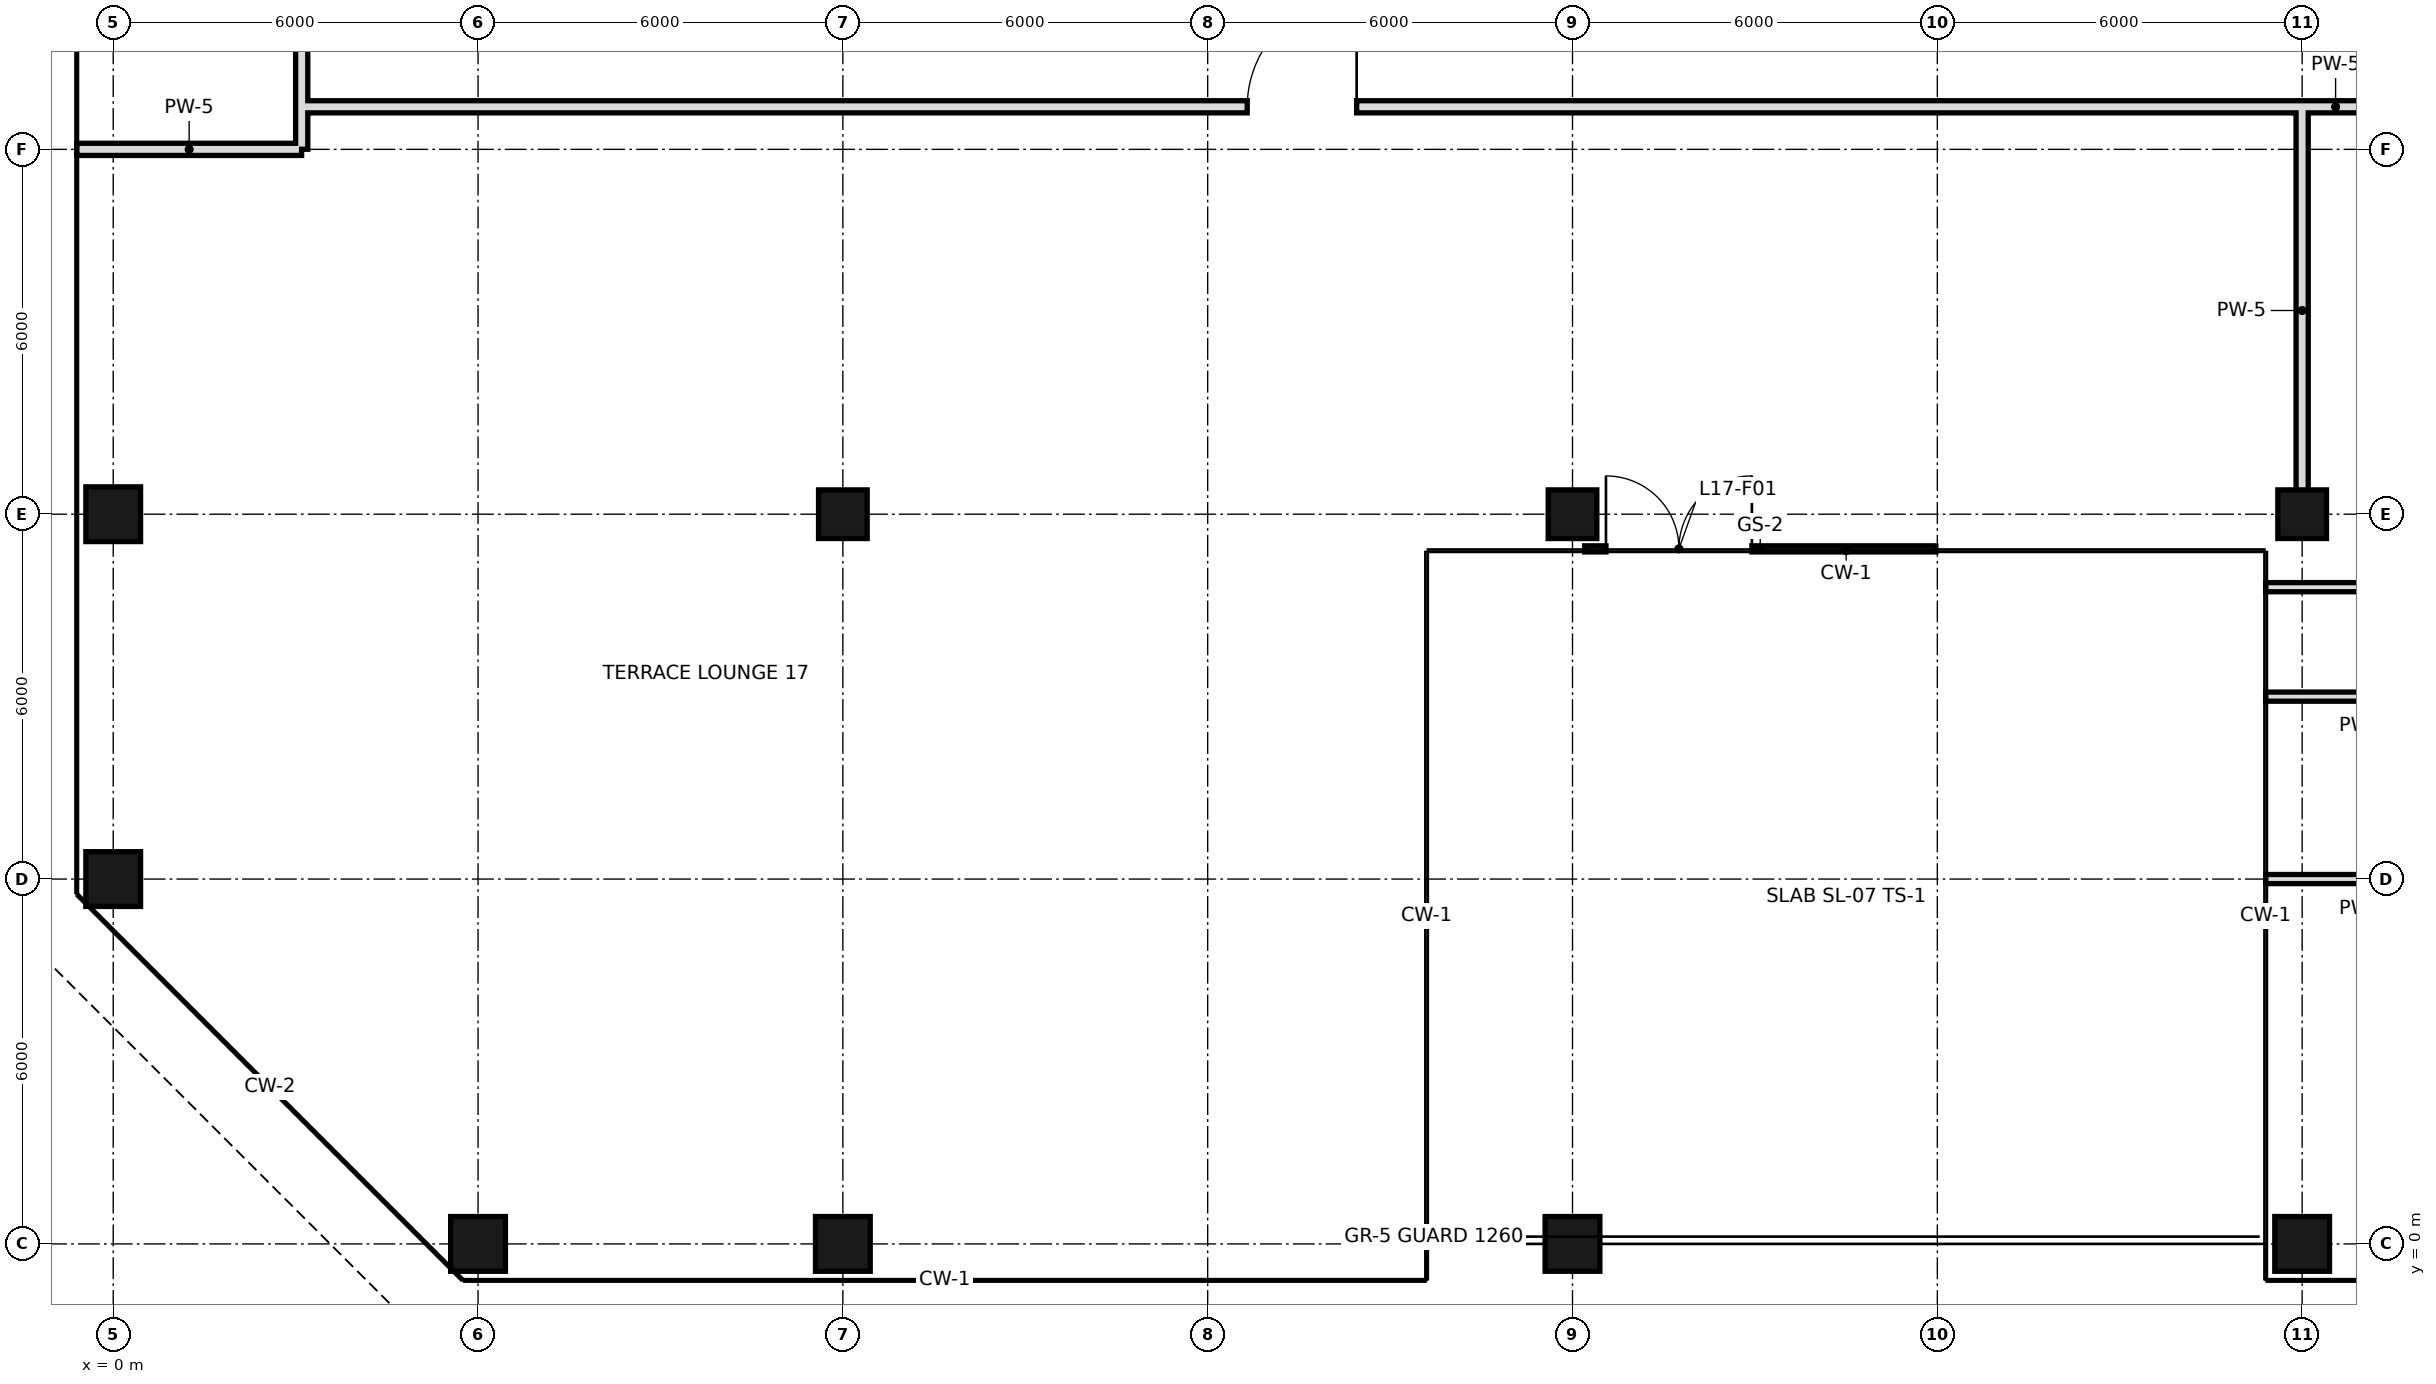
"""IFC4 building model, lengths in metres.
Left out: names, types, materials, properties, quantities, classifications, styles, units other than length and angle.
Written with IfcOpenShell. Run it as: python <this file> out.ifc"""

import sys

from ifc_helpers import new_model, si_unit, direction, frame, frame_2d, origin, origin_2d, place, context, subcontext, project, spatial, rectangle, hollow_rectangle, extrude, element, fill, save


model = new_model("IFC4")
c1 = context("Model", 3, precision=1e-05, world=origin(), true_north=direction((0.0, 1.0)))
c2 = subcontext(c1, "Body", "Model", "MODEL_VIEW")
j1 = project(units=[si_unit("LENGTHUNIT", "METRE"), si_unit("PLANEANGLEUNIT", "RADIAN")], contexts=[c1])
p1 = place(None, origin())
s1 = spatial("IfcSite", under=j1, at=p1, CompositionType="ELEMENT")
p2 = place(p1, origin())
s2 = spatial("IfcBuilding", under=s1, at=p2, CompositionType="ELEMENT")
p3 = place(p2, frame((0.0, 0.0, 82.2)))
s3 = spatial("IfcBuildingStorey", under=s2, at=p3, CompositionType="ELEMENT", Elevation=82.2)
for number, where, z_axis, x_axis in (
    (1, (0.0, 6.0, 0.0), (0.0, 0.0, 1.0), (1.0, 0.0, 0.0)),
    (2, (0.0, 12.0, 0.0), (0.0, 0.0, 1.0), (1.0, 0.0, 0.0)),
    (3, (6.0, 0.0, 0.0), (0.0, 0.0, 1.0), (1.0, 0.0, 0.0)),
    (4, (12.0, 0.0, 0.0), (0.0, 0.0, 1.0), (1.0, 0.0, 0.0)),
):
    element("IfcColumn", number, at=place(p3, frame(where, z_axis=z_axis, x_axis=x_axis)), inside=s3, PredefinedType="COLUMN", context=c2, shape_type="SweptSolid", body=[
        extrude(hollow_rectangle(XDim=0.9, YDim=0.9, WallThickness=0.045, at=origin_2d()), origin(), (0.0, 0.0, 1.0), 3.6),
    ])
p4 = place(p3, frame((12.0, 12.0, 0.0), z_axis=(0.0, 0.0, 1.0), x_axis=(1.0, 0.0, 0.0)))
e5 = element("IfcColumn", 5, at=p4, inside=s3, PredefinedType="COLUMN", context=c2, shape_type="SweptSolid", body=[
    extrude(hollow_rectangle(XDim=0.8, YDim=0.8, WallThickness=0.04, at=origin_2d()), origin(), (0.0, 0.0, 1.0), 3.6),
])
p5 = place(p3, frame((24.0, 0.0, 0.0), z_axis=(0.0, 0.0, 1.0), x_axis=(1.0, 0.0, 0.0)))
e6 = element("IfcColumn", 6, at=p5, inside=s3, PredefinedType="COLUMN", context=c2, shape_type="SweptSolid", body=[
    extrude(hollow_rectangle(XDim=0.9, YDim=0.9, WallThickness=0.045, at=origin_2d()), origin(), (0.0, 0.0, 1.0), 3.6),
])
p6 = place(p3, frame((24.0, 12.0, 0.0), z_axis=(0.0, 0.0, 1.0), x_axis=(1.0, 0.0, 0.0)))
e7 = element("IfcColumn", 7, at=p6, inside=s3, PredefinedType="COLUMN", context=c2, shape_type="SweptSolid", body=[
    extrude(hollow_rectangle(XDim=0.8, YDim=0.8, WallThickness=0.04, at=origin_2d()), origin(), (0.0, 0.0, 1.0), 3.6),
])
p7 = place(p3, frame((36.0, 0.0, 0.0), z_axis=(0.0, 0.0, 1.0), x_axis=(1.0, 0.0, 0.0)))
e8 = element("IfcColumn", 8, at=p7, inside=s3, PredefinedType="COLUMN", context=c2, shape_type="SweptSolid", body=[
    extrude(hollow_rectangle(XDim=0.9, YDim=0.9, WallThickness=0.045, at=origin_2d()), origin(), (0.0, 0.0, 1.0), 3.6),
])
p8 = place(p3, frame((36.0, 12.0, 0.0), z_axis=(0.0, 0.0, 1.0), x_axis=(1.0, 0.0, 0.0)))
e9 = element("IfcColumn", 9, at=p8, inside=s3, PredefinedType="COLUMN", context=c2, shape_type="SweptSolid", body=[
    extrude(hollow_rectangle(XDim=0.8, YDim=0.8, WallThickness=0.04, at=origin_2d()), origin(), (0.0, 0.0, 1.0), 3.6),
])
p9 = place(p3, frame((24.2, 11.43, 0.0), z_axis=(0.0, 0.0, 1.0), x_axis=(1.0, 0.0, 0.0)))
e10 = element("IfcWall", 10, at=p9, inside=s3, PredefinedType="SOLIDWALL", context=c2, shape_type="SweptSolid", body=[
    extrude(rectangle(XDim=5.775, YDim=0.1, at=frame_2d((2.888, 0.0))), origin(), (0.0, 0.0, 1.0), 3.42),
])
p10 = place(p9, frame((0.35, 0.0, 0.0)))
e11 = element("IfcOpeningElement", 11, at=p10, cuts=e10, PredefinedType="OPENING", context=c2, shape_type="SweptSolid", body=[
    extrude(rectangle(XDim=2.4, YDim=2.4, at=frame_2d((1.2, 1.2))), frame((0.0, 0.06, 0.0), z_axis=(0.0, -1.0, 0.0), x_axis=(1.0, 0.0, 0.0)), (0.0, 0.0, 1.0), 0.12),
])
p11 = place(p3, frame((3.1, 18.002, 0.0), z_axis=(0.0, 0.0, 1.0), x_axis=(0.0, 1.0, 0.0)))
e12 = element("IfcWall", 12, at=p11, inside=s3, PredefinedType="SOLIDWALL", context=c2, shape_type="SweptSolid", body=[
    extrude(rectangle(XDim=27.947, YDim=0.2, at=frame_2d((13.974, 0.0))), origin(), (0.0, 0.0, 1.0), 2.97),
])
p12 = place(p11, frame((13.3, 0.0, 0.0)))
e13 = element("IfcOpeningElement", 13, at=p12, cuts=e12, PredefinedType="OPENING", context=c2, shape_type="SweptSolid", body=[
    extrude(rectangle(XDim=1.2, YDim=2.4, at=frame_2d((0.6, 1.2))), frame((0.0, 0.11, 0.0), z_axis=(0.0, -1.0, 0.0), x_axis=(1.0, 0.0, 0.0)), (0.0, 0.0, 1.0), 0.22),
])
p13 = place(p3, frame((36.0, 12.0, 0.0), z_axis=(0.0, 0.0, 1.0), x_axis=(0.0, 1.0, 0.0)))
e14 = element("IfcWall", 14, at=p13, inside=s3, PredefinedType="SOLIDWALL", context=c2, shape_type="SweptSolid", body=[
    extrude(rectangle(XDim=6.7, YDim=0.2, at=frame_2d((3.35, 0.0))), origin(), (0.0, 0.0, 1.0), 2.72),
])
p14 = place(p3, frame((35.4, 10.8, 0.0), z_axis=(0.0, 0.0, 1.0), x_axis=(1.0, 0.0, 0.0)))
e15 = element("IfcWall", 15, at=p14, inside=s3, PredefinedType="PARTITIONING", context=c2, shape_type="SweptSolid", body=[
    extrude(rectangle(XDim=6.6, YDim=0.15, at=frame_2d((3.3, 0.0))), origin(), (0.0, 0.0, 1.0), 3.42),
])
p15 = place(p14, frame((2.2, 0.0, 0.0)))
e16 = element("IfcOpeningElement", 16, at=p15, cuts=e15, PredefinedType="OPENING", context=c2, shape_type="SweptSolid", body=[
    extrude(rectangle(XDim=1.0, YDim=2.4, at=frame_2d((0.5, 1.2))), frame((0.0, 0.085, 0.0), z_axis=(0.0, -1.0, 0.0), x_axis=(1.0, 0.0, 0.0)), (0.0, 0.0, 1.0), 0.17),
])
p16 = place(p3, frame((-0.6, 18.0, 0.0), z_axis=(0.0, 0.0, 1.0), x_axis=(1.0, 0.0, 0.0)))
e17 = element("IfcWall", 17, at=p16, inside=s3, PredefinedType="SOLIDWALL", context=c2, shape_type="SweptSolid", body=[
    extrude(rectangle(XDim=3.698, YDim=0.2, at=frame_2d((1.849, 0.0))), origin(), (0.0, 0.0, 1.0), 2.72),
])
p17 = place(p3, frame((3.1, 18.7, 0.0), z_axis=(0.0, 0.0, 1.0), x_axis=(1.0, 0.0, 0.0)))
e18 = element("IfcWall", 18, at=p17, inside=s3, PredefinedType="SOLIDWALL", context=c2, shape_type="SweptSolid", body=[
    extrude(rectangle(XDim=41.8, YDim=0.2, at=frame_2d((20.9, 0.0))), origin(), (0.0, 0.0, 1.0), 2.72),
])
p18 = place(p17, frame((36.16, 0.0, 0.0)))
e19 = element("IfcOpeningElement", 19, at=p18, cuts=e18, PredefinedType="OPENING", context=c2, shape_type="SweptSolid", body=[
    extrude(rectangle(XDim=1.2, YDim=2.4, at=frame_2d((0.6, 1.2))), frame((0.0, 0.11, 0.0), z_axis=(0.0, -1.0, 0.0), x_axis=(1.0, 0.0, 0.0)), (0.0, 0.0, 1.0), 0.22),
])
p19 = place(p17, frame((15.55, 0.0, 0.0)))
e20 = element("IfcOpeningElement", 20, at=p19, cuts=e18, PredefinedType="OPENING", context=c2, shape_type="SweptSolid", body=[
    extrude(rectangle(XDim=1.8, YDim=2.4, at=frame_2d((0.9, 1.2))), frame((0.0, 0.11, 0.0), z_axis=(0.0, -1.0, 0.0), x_axis=(1.0, 0.0, 0.0)), (0.0, 0.0, 1.0), 0.22),
])
p20 = place(p3, frame((35.4, 6.0, 0.0), z_axis=(0.0, 0.0, 1.0), x_axis=(1.0, 0.0, 0.0)))
e21 = element("IfcWall", 21, at=p20, inside=s3, PredefinedType="PARTITIONING", context=c2, shape_type="SweptSolid", body=[
    extrude(rectangle(XDim=4.2, YDim=0.15, at=frame_2d((2.1, 0.0))), origin(), (0.0, 0.0, 1.0), 2.97),
])
p21 = place(p20, frame((2.32, 0.0, 0.0)))
e22 = element("IfcOpeningElement", 22, at=p21, cuts=e21, PredefinedType="OPENING", context=c2, shape_type="SweptSolid", body=[
    extrude(rectangle(XDim=1.0, YDim=2.4, at=frame_2d((0.5, 1.2))), frame((0.0, 0.085, 0.0), z_axis=(0.0, -1.0, 0.0), x_axis=(1.0, 0.0, 0.0)), (0.0, 0.0, 1.0), 0.17),
])
p22 = place(p3, frame((35.4, 9.0, 0.0), z_axis=(0.0, 0.0, 1.0), x_axis=(1.0, 0.0, 0.0)))
e23 = element("IfcWall", 23, at=p22, inside=s3, PredefinedType="PARTITIONING", context=c2, shape_type="SweptSolid", body=[
    extrude(rectangle(XDim=4.2, YDim=0.15, at=frame_2d((2.1, 0.0))), origin(), (0.0, 0.0, 1.0), 3.42),
])
p23 = place(p22, frame((2.32, 0.0, 0.0)))
e24 = element("IfcOpeningElement", 24, at=p23, cuts=e23, PredefinedType="OPENING", context=c2, shape_type="SweptSolid", body=[
    extrude(rectangle(XDim=1.0, YDim=2.4, at=frame_2d((0.5, 1.2))), frame((0.0, 0.085, 0.0), z_axis=(0.0, -1.0, 0.0), x_axis=(1.0, 0.0, 0.0)), (0.0, 0.0, 1.0), 0.17),
])
p24 = place(p10, origin())
e25 = element("IfcDoor", 25, at=p24, inside=s3, OperationType="DOUBLE_DOOR_SINGLE_SWING", PredefinedType="DOOR", context=c2, shape_type="SweptSolid", body=[
    extrude(rectangle(XDim=2.4, YDim=2.4, at=frame_2d((1.2, 1.2))), frame((0.0, 0.025, 0.0), z_axis=(0.0, -1.0, 0.0), x_axis=(1.0, 0.0, 0.0)), (0.0, 0.0, 1.0), 0.05),
])
fill(e11, e25)
p25 = place(p19, frame((1.8, 0.0, 0.0), z_axis=(0.0, 0.0, 1.0), x_axis=(-1.0, 0.0, 0.0)))
e26 = element("IfcDoor", 26, at=p25, inside=s3, OperationType="SINGLE_SWING_LEFT", PredefinedType="DOOR", context=c2, shape_type="SweptSolid", body=[
    extrude(rectangle(XDim=1.8, YDim=2.4, at=frame_2d((0.9, 1.2))), frame((0.0, 0.025, 0.0), z_axis=(0.0, -1.0, 0.0), x_axis=(1.0, 0.0, 0.0)), (0.0, 0.0, 1.0), 0.05),
])
fill(e20, e26)
save(model, sys.argv[1])
